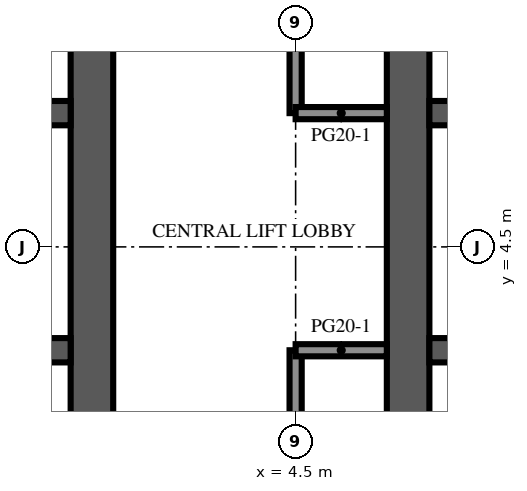
"""IFC4 building model, lengths in metres.
Left out: names, types, materials, properties, quantities, classifications, styles, units other than length and angle.
Written with IfcOpenShell. Run it as: python <this file> out.ifc"""

import sys

from ifc_helpers import new_model, si_unit, direction, frame, frame_2d, origin, place, context, subcontext, project, spatial, rectangle, extrude, element, fill, save


model = new_model("IFC4")
c1 = context("Model", 3, precision=1e-05, world=origin(), true_north=direction((0.0, 1.0)))
c2 = subcontext(c1, "Body", "Model", "MODEL_VIEW")
j1 = project(units=[si_unit("LENGTHUNIT", "METRE"), si_unit("PLANEANGLEUNIT", "RADIAN")], contexts=[c1])
p1 = place(None, origin())
s1 = spatial("IfcSite", under=j1, at=p1, CompositionType="ELEMENT")
p2 = place(p1, origin())
s2 = spatial("IfcBuilding", under=s1, at=p2, CompositionType="ELEMENT")
p3 = place(p2, frame((0.0, 0.0, 278.6)))
s3 = spatial("IfcBuildingStorey", under=s2, at=p3, CompositionType="ELEMENT", Elevation=278.6)
p4 = place(p3, frame((1.15, -9.0, 0.0), z_axis=(0.0, 0.0, 1.0), x_axis=(0.0, 1.0, 0.0)))
e1 = element("IfcWall", 1, at=p4, inside=s3, PredefinedType="SHEAR", context=c2, shape_type="SweptSolid", body=[
    extrude(rectangle(XDim=27.5, YDim=0.7, at=frame_2d((13.75, 0.0))), origin(), (0.0, 0.0, 1.0), 4.1),
])
p5 = place(p4, frame((12.55, 0.0, 0.0)))
e2 = element("IfcOpeningElement", 2, at=p5, cuts=e1, PredefinedType="OPENING", context=c2, shape_type="SweptSolid", body=[
    extrude(rectangle(XDim=2.4, YDim=2.4, at=frame_2d((1.2, 1.2))), frame((0.0, 0.36, 0.0), z_axis=(0.0, -1.0, 0.0), x_axis=(1.0, 0.0, 0.0)), (0.0, 0.0, 1.0), 0.72),
])
p6 = place(p4, frame((3.9, 0.0, 0.0)))
e3 = element("IfcOpeningElement", 3, at=p6, cuts=e1, PredefinedType="OPENING", context=c2, shape_type="SweptSolid", body=[
    extrude(rectangle(XDim=1.2, YDim=2.1, at=frame_2d((0.6, 1.05))), frame((0.0, 0.36, 0.0), z_axis=(0.0, -1.0, 0.0), x_axis=(1.0, 0.0, 0.0)), (0.0, 0.0, 1.0), 0.72),
])
p7 = place(p4, frame((19.46, 0.0, 0.0)))
e4 = element("IfcOpeningElement", 4, at=p7, cuts=e1, PredefinedType="OPENING", context=c2, shape_type="SweptSolid", body=[
    extrude(rectangle(XDim=1.0, YDim=2.1, at=frame_2d((0.5, 1.05))), frame((0.0, 0.36, 0.0), z_axis=(0.0, -1.0, 0.0), x_axis=(1.0, 0.0, 0.0)), (0.0, 0.0, 1.0), 0.72),
])
p8 = place(p4, frame((21.17, 0.0, 0.0)))
e5 = element("IfcOpeningElement", 5, at=p8, cuts=e1, PredefinedType="OPENING", context=c2, shape_type="SweptSolid", body=[
    extrude(rectangle(XDim=1.0, YDim=2.1, at=frame_2d((0.5, 1.05))), frame((0.0, 0.36, 0.0), z_axis=(0.0, -1.0, 0.0), x_axis=(1.0, 0.0, 0.0)), (0.0, 0.0, 1.0), 0.72),
])
p9 = place(p4, frame((23.26, 0.0, 0.0)))
e6 = element("IfcOpeningElement", 6, at=p9, cuts=e1, PredefinedType="OPENING", context=c2, shape_type="SweptSolid", body=[
    extrude(rectangle(XDim=1.0, YDim=2.1, at=frame_2d((0.5, 1.05))), frame((0.0, 0.36, 0.0), z_axis=(0.0, -1.0, 0.0), x_axis=(1.0, 0.0, 0.0)), (0.0, 0.0, 1.0), 0.72),
])
p10 = place(p4, frame((25.35, 0.0, 0.0)))
e7 = element("IfcOpeningElement", 7, at=p10, cuts=e1, PredefinedType="OPENING", context=c2, shape_type="SweptSolid", body=[
    extrude(rectangle(XDim=1.0, YDim=2.1, at=frame_2d((0.5, 1.05))), frame((0.0, 0.36, 0.0), z_axis=(0.0, -1.0, 0.0), x_axis=(1.0, 0.0, 0.0)), (0.0, 0.0, 1.0), 0.72),
])
p11 = place(p3, frame((-9.8, 2.8, 0.0), z_axis=(0.0, 0.0, 1.0), x_axis=(1.0, 0.0, 0.0)))
e8 = element("IfcWall", 8, at=p11, inside=s3, PredefinedType="SHEAR", context=c2, shape_type="SweptSolid", body=[
    extrude(rectangle(XDim=10.6, YDim=0.4, at=frame_2d((5.3, 0.0))), origin(), (0.0, 0.0, 1.0), 4.1),
])
p12 = place(p11, frame((0.688, 0.0, 0.0)))
e9 = element("IfcOpeningElement", 9, at=p12, cuts=e8, PredefinedType="OPENING", context=c2, shape_type="SweptSolid", body=[
    extrude(rectangle(XDim=1.1, YDim=2.1, at=frame_2d((0.55, 1.05))), frame((0.0, 0.21, 0.0), z_axis=(0.0, -1.0, 0.0), x_axis=(1.0, 0.0, 0.0)), (0.0, 0.0, 1.0), 0.42),
])
p13 = place(p11, frame((3.438, 0.0, 0.0)))
e10 = element("IfcOpeningElement", 10, at=p13, cuts=e8, PredefinedType="OPENING", context=c2, shape_type="SweptSolid", body=[
    extrude(rectangle(XDim=1.1, YDim=2.1, at=frame_2d((0.55, 1.05))), frame((0.0, 0.21, 0.0), z_axis=(0.0, -1.0, 0.0), x_axis=(1.0, 0.0, 0.0)), (0.0, 0.0, 1.0), 0.42),
])
p14 = place(p11, frame((6.113, 0.0, 0.0)))
e11 = element("IfcOpeningElement", 11, at=p14, cuts=e8, PredefinedType="OPENING", context=c2, shape_type="SweptSolid", body=[
    extrude(rectangle(XDim=1.0, YDim=2.1, at=frame_2d((0.5, 1.05))), frame((0.0, 0.21, 0.0), z_axis=(0.0, -1.0, 0.0), x_axis=(1.0, 0.0, 0.0)), (0.0, 0.0, 1.0), 0.42),
])
p15 = place(p11, frame((8.863, 0.0, 0.0)))
e12 = element("IfcOpeningElement", 12, at=p15, cuts=e8, PredefinedType="OPENING", context=c2, shape_type="SweptSolid", body=[
    extrude(rectangle(XDim=1.0, YDim=2.1, at=frame_2d((0.5, 1.05))), frame((0.0, 0.21, 0.0), z_axis=(0.0, -1.0, 0.0), x_axis=(1.0, 0.0, 0.0)), (0.0, 0.0, 1.0), 0.42),
])
p16 = place(p3, frame((-9.8, 6.7, 0.0), z_axis=(0.0, 0.0, 1.0), x_axis=(1.0, 0.0, 0.0)))
e13 = element("IfcWall", 13, at=p16, inside=s3, PredefinedType="SHEAR", context=c2, shape_type="SweptSolid", body=[
    extrude(rectangle(XDim=10.6, YDim=0.4, at=frame_2d((5.3, 0.0))), origin(), (0.0, 0.0, 1.0), 4.1),
])
p17 = place(p16, frame((3.438, 0.0, 0.0)))
e14 = element("IfcOpeningElement", 14, at=p17, cuts=e13, PredefinedType="OPENING", context=c2, shape_type="SweptSolid", body=[
    extrude(rectangle(XDim=1.1, YDim=2.1, at=frame_2d((0.55, 1.05))), frame((0.0, 0.21, 0.0), z_axis=(0.0, -1.0, 0.0), x_axis=(1.0, 0.0, 0.0)), (0.0, 0.0, 1.0), 0.42),
])
p18 = place(p16, frame((6.062, 0.0, 0.0)))
e15 = element("IfcOpeningElement", 15, at=p18, cuts=e13, PredefinedType="OPENING", context=c2, shape_type="SweptSolid", body=[
    extrude(rectangle(XDim=1.1, YDim=2.1, at=frame_2d((0.55, 1.05))), frame((0.0, 0.21, 0.0), z_axis=(0.0, -1.0, 0.0), x_axis=(1.0, 0.0, 0.0)), (0.0, 0.0, 1.0), 0.42),
])
p19 = place(p16, frame((8.812, 0.0, 0.0)))
e16 = element("IfcOpeningElement", 16, at=p19, cuts=e13, PredefinedType="OPENING", context=c2, shape_type="SweptSolid", body=[
    extrude(rectangle(XDim=1.1, YDim=2.1, at=frame_2d((0.55, 1.05))), frame((0.0, 0.21, 0.0), z_axis=(0.0, -1.0, 0.0), x_axis=(1.0, 0.0, 0.0)), (0.0, 0.0, 1.0), 0.42),
])
p20 = place(p16, frame((0.738, 0.0, 0.0)))
e17 = element("IfcOpeningElement", 17, at=p20, cuts=e13, PredefinedType="OPENING", context=c2, shape_type="SweptSolid", body=[
    extrude(rectangle(XDim=1.0, YDim=2.1, at=frame_2d((0.5, 1.05))), frame((0.0, 0.21, 0.0), z_axis=(0.0, -1.0, 0.0), x_axis=(1.0, 0.0, 0.0)), (0.0, 0.0, 1.0), 0.42),
])
p21 = place(p3, frame((6.35, -9.0, 0.0), z_axis=(0.0, 0.0, 1.0), x_axis=(0.0, 1.0, 0.0)))
e18 = element("IfcWall", 18, at=p21, inside=s3, PredefinedType="SHEAR", context=c2, shape_type="SweptSolid", body=[
    extrude(rectangle(XDim=27.5, YDim=0.7, at=frame_2d((13.75, 0.0))), origin(), (0.0, 0.0, 1.0), 4.1),
])
p22 = place(p21, frame((12.55, 0.0, 0.0)))
e19 = element("IfcOpeningElement", 19, at=p22, cuts=e18, PredefinedType="OPENING", context=c2, shape_type="SweptSolid", body=[
    extrude(rectangle(XDim=2.4, YDim=2.4, at=frame_2d((1.2, 1.2))), frame((0.0, 0.36, 0.0), z_axis=(0.0, -1.0, 0.0), x_axis=(1.0, 0.0, 0.0)), (0.0, 0.0, 1.0), 0.72),
])
p23 = place(p21, frame((3.9, 0.0, 0.0)))
e20 = element("IfcOpeningElement", 20, at=p23, cuts=e18, PredefinedType="OPENING", context=c2, shape_type="SweptSolid", body=[
    extrude(rectangle(XDim=1.2, YDim=2.1, at=frame_2d((0.6, 1.05))), frame((0.0, 0.36, 0.0), z_axis=(0.0, -1.0, 0.0), x_axis=(1.0, 0.0, 0.0)), (0.0, 0.0, 1.0), 0.72),
])
p24 = place(p21, frame((19.46, 0.0, 0.0)))
e21 = element("IfcOpeningElement", 21, at=p24, cuts=e18, PredefinedType="OPENING", context=c2, shape_type="SweptSolid", body=[
    extrude(rectangle(XDim=1.0, YDim=2.1, at=frame_2d((0.5, 1.05))), frame((0.0, 0.36, 0.0), z_axis=(0.0, -1.0, 0.0), x_axis=(1.0, 0.0, 0.0)), (0.0, 0.0, 1.0), 0.72),
])
p25 = place(p21, frame((21.17, 0.0, 0.0)))
e22 = element("IfcOpeningElement", 22, at=p25, cuts=e18, PredefinedType="OPENING", context=c2, shape_type="SweptSolid", body=[
    extrude(rectangle(XDim=1.0, YDim=2.1, at=frame_2d((0.5, 1.05))), frame((0.0, 0.36, 0.0), z_axis=(0.0, -1.0, 0.0), x_axis=(1.0, 0.0, 0.0)), (0.0, 0.0, 1.0), 0.72),
])
p26 = place(p21, frame((23.26, 0.0, 0.0)))
e23 = element("IfcOpeningElement", 23, at=p26, cuts=e18, PredefinedType="OPENING", context=c2, shape_type="SweptSolid", body=[
    extrude(rectangle(XDim=1.0, YDim=2.1, at=frame_2d((0.5, 1.05))), frame((0.0, 0.36, 0.0), z_axis=(0.0, -1.0, 0.0), x_axis=(1.0, 0.0, 0.0)), (0.0, 0.0, 1.0), 0.72),
])
p27 = place(p21, frame((25.35, 0.0, 0.0)))
e24 = element("IfcOpeningElement", 24, at=p27, cuts=e18, PredefinedType="OPENING", context=c2, shape_type="SweptSolid", body=[
    extrude(rectangle(XDim=1.0, YDim=2.1, at=frame_2d((0.5, 1.05))), frame((0.0, 0.36, 0.0), z_axis=(0.0, -1.0, 0.0), x_axis=(1.0, 0.0, 0.0)), (0.0, 0.0, 1.0), 0.72),
])
p28 = place(p3, frame((6.7, 2.8, 0.0), z_axis=(0.0, 0.0, 1.0), x_axis=(1.0, 0.0, 0.0)))
e25 = element("IfcWall", 25, at=p28, inside=s3, PredefinedType="SHEAR", context=c2, shape_type="SweptSolid", body=[
    extrude(rectangle(XDim=10.6, YDim=0.4, at=frame_2d((5.3, 0.0))), origin(), (0.0, 0.0, 1.0), 4.1),
])
p29 = place(p28, frame((0.688, 0.0, 0.0)))
e26 = element("IfcOpeningElement", 26, at=p29, cuts=e25, PredefinedType="OPENING", context=c2, shape_type="SweptSolid", body=[
    extrude(rectangle(XDim=1.1, YDim=2.1, at=frame_2d((0.55, 1.05))), frame((0.0, 0.21, 0.0), z_axis=(0.0, -1.0, 0.0), x_axis=(1.0, 0.0, 0.0)), (0.0, 0.0, 1.0), 0.42),
])
p30 = place(p28, frame((3.438, 0.0, 0.0)))
e27 = element("IfcOpeningElement", 27, at=p30, cuts=e25, PredefinedType="OPENING", context=c2, shape_type="SweptSolid", body=[
    extrude(rectangle(XDim=1.1, YDim=2.1, at=frame_2d((0.55, 1.05))), frame((0.0, 0.21, 0.0), z_axis=(0.0, -1.0, 0.0), x_axis=(1.0, 0.0, 0.0)), (0.0, 0.0, 1.0), 0.42),
])
p31 = place(p28, frame((6.113, 0.0, 0.0)))
e28 = element("IfcOpeningElement", 28, at=p31, cuts=e25, PredefinedType="OPENING", context=c2, shape_type="SweptSolid", body=[
    extrude(rectangle(XDim=1.0, YDim=2.1, at=frame_2d((0.5, 1.05))), frame((0.0, 0.21, 0.0), z_axis=(0.0, -1.0, 0.0), x_axis=(1.0, 0.0, 0.0)), (0.0, 0.0, 1.0), 0.42),
])
p32 = place(p28, frame((8.863, 0.0, 0.0)))
e29 = element("IfcOpeningElement", 29, at=p32, cuts=e25, PredefinedType="OPENING", context=c2, shape_type="SweptSolid", body=[
    extrude(rectangle(XDim=1.0, YDim=2.1, at=frame_2d((0.5, 1.05))), frame((0.0, 0.21, 0.0), z_axis=(0.0, -1.0, 0.0), x_axis=(1.0, 0.0, 0.0)), (0.0, 0.0, 1.0), 0.42),
])
p33 = place(p3, frame((6.7, 6.7, 0.0), z_axis=(0.0, 0.0, 1.0), x_axis=(1.0, 0.0, 0.0)))
e30 = element("IfcWall", 30, at=p33, inside=s3, PredefinedType="SHEAR", context=c2, shape_type="SweptSolid", body=[
    extrude(rectangle(XDim=10.6, YDim=0.4, at=frame_2d((5.3, 0.0))), origin(), (0.0, 0.0, 1.0), 4.1),
])
p34 = place(p33, frame((3.438, 0.0, 0.0)))
e31 = element("IfcOpeningElement", 31, at=p34, cuts=e30, PredefinedType="OPENING", context=c2, shape_type="SweptSolid", body=[
    extrude(rectangle(XDim=1.1, YDim=2.1, at=frame_2d((0.55, 1.05))), frame((0.0, 0.21, 0.0), z_axis=(0.0, -1.0, 0.0), x_axis=(1.0, 0.0, 0.0)), (0.0, 0.0, 1.0), 0.42),
])
p35 = place(p33, frame((6.062, 0.0, 0.0)))
e32 = element("IfcOpeningElement", 32, at=p35, cuts=e30, PredefinedType="OPENING", context=c2, shape_type="SweptSolid", body=[
    extrude(rectangle(XDim=1.1, YDim=2.1, at=frame_2d((0.55, 1.05))), frame((0.0, 0.21, 0.0), z_axis=(0.0, -1.0, 0.0), x_axis=(1.0, 0.0, 0.0)), (0.0, 0.0, 1.0), 0.42),
])
p36 = place(p33, frame((8.812, 0.0, 0.0)))
e33 = element("IfcOpeningElement", 33, at=p36, cuts=e30, PredefinedType="OPENING", context=c2, shape_type="SweptSolid", body=[
    extrude(rectangle(XDim=1.1, YDim=2.1, at=frame_2d((0.55, 1.05))), frame((0.0, 0.21, 0.0), z_axis=(0.0, -1.0, 0.0), x_axis=(1.0, 0.0, 0.0)), (0.0, 0.0, 1.0), 0.42),
])
p37 = place(p33, frame((0.738, 0.0, 0.0)))
e34 = element("IfcOpeningElement", 34, at=p37, cuts=e30, PredefinedType="OPENING", context=c2, shape_type="SweptSolid", body=[
    extrude(rectangle(XDim=1.0, YDim=2.1, at=frame_2d((0.5, 1.05))), frame((0.0, 0.21, 0.0), z_axis=(0.0, -1.0, 0.0), x_axis=(1.0, 0.0, 0.0)), (0.0, 0.0, 1.0), 0.42),
])
p38 = place(p3, frame((4.5, 2.8, 0.0), z_axis=(0.0, 0.0, 1.0), x_axis=(0.0, -1.0, 0.0)))
e35 = element("IfcWall", 35, at=p38, inside=s3, PredefinedType="PARTITIONING", context=c2, shape_type="SweptSolid", body=[
    extrude(rectangle(XDim=6.3, YDim=0.2, at=frame_2d((3.15, 0.0))), origin(), (0.0, 0.0, 1.0), 3.65),
])
p39 = place(p38, frame((2.45, 0.0, 0.0)))
e36 = element("IfcOpeningElement", 36, at=p39, cuts=e35, PredefinedType="OPENING", context=c2, shape_type="SweptSolid", body=[
    extrude(rectangle(XDim=1.0, YDim=2.1, at=frame_2d((0.5, 1.05))), frame((0.0, 0.11, 0.0), z_axis=(0.0, -1.0, 0.0), x_axis=(1.0, 0.0, 0.0)), (0.0, 0.0, 1.0), 0.22),
])
p40 = place(p3, frame((4.5, 18.5, 0.0), z_axis=(0.0, 0.0, 1.0), x_axis=(0.0, -1.0, 0.0)))
e37 = element("IfcWall", 37, at=p40, inside=s3, PredefinedType="PARTITIONING", context=c2, shape_type="SweptSolid", body=[
    extrude(rectangle(XDim=11.8, YDim=0.2, at=frame_2d((5.9, 0.0))), origin(), (0.0, 0.0, 1.0), 3.65),
])
p41 = place(p40, frame((4.7, 0.0, 0.0)))
e38 = element("IfcOpeningElement", 38, at=p41, cuts=e37, PredefinedType="OPENING", context=c2, shape_type="SweptSolid", body=[
    extrude(rectangle(XDim=1.0, YDim=2.1, at=frame_2d((0.5, 1.05))), frame((0.0, 0.11, 0.0), z_axis=(0.0, -1.0, 0.0), x_axis=(1.0, 0.0, 0.0)), (0.0, 0.0, 1.0), 0.22),
])
for number, where, z_axis, x_axis in (
    (39, (4.5, 2.8, 0.0), (0.0, 0.0, 1.0), (1.0, 0.0, 0.0)),
    (40, (4.5, 6.7, 0.0), (0.0, 0.0, 1.0), (1.0, 0.0, 0.0)),
):
    element("IfcWall", number, at=place(p3, frame(where, z_axis=z_axis, x_axis=x_axis)), inside=s3, PredefinedType="PARTITIONING", context=c2, shape_type="SweptSolid", body=[
        extrude(rectangle(XDim=1.5, YDim=0.2, at=frame_2d((0.75, 0.0))), origin(), (0.0, 0.0, 1.0), 3.65),
    ])
p42 = place(p5, origin())
e41 = element("IfcDoor", 41, at=p42, inside=s3, OperationType="DOUBLE_DOOR_DOUBLE_SWING", PredefinedType="DOOR", context=c2, shape_type="SweptSolid", body=[
    extrude(rectangle(XDim=2.4, YDim=2.4, at=frame_2d((1.2, 1.2))), frame((0.0, 0.025, 0.0), z_axis=(0.0, -1.0, 0.0), x_axis=(1.0, 0.0, 0.0)), (0.0, 0.0, 1.0), 0.05),
])
fill(e2, e41)
p43 = place(p22, origin())
e42 = element("IfcDoor", 42, at=p43, inside=s3, OperationType="DOUBLE_DOOR_DOUBLE_SWING", PredefinedType="DOOR", context=c2, shape_type="SweptSolid", body=[
    extrude(rectangle(XDim=2.4, YDim=2.4, at=frame_2d((1.2, 1.2))), frame((0.0, 0.025, 0.0), z_axis=(0.0, -1.0, 0.0), x_axis=(1.0, 0.0, 0.0)), (0.0, 0.0, 1.0), 0.05),
])
fill(e19, e42)
save(model, sys.argv[1])
